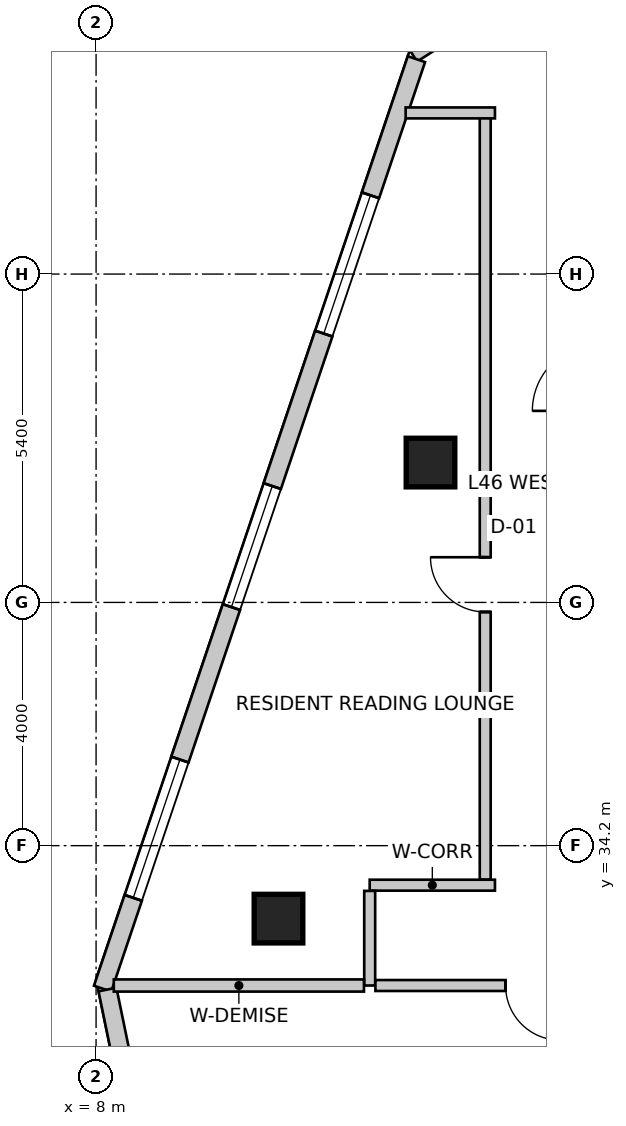
"""IFC4 building model, lengths in metres.
Left out: names, types, materials, properties, quantities, classifications, styles, units other than length and angle.
Written with IfcOpenShell. Run it as: python <this file> out.ifc"""

import sys

from ifc_helpers import new_model, si_unit, direction, frame, frame_2d, origin, origin_2d, place, context, subcontext, project, spatial, rectangle, extrude, source, transform, mapped, element, fill, save


model = new_model("IFC4")
c1 = context("Model", 3, precision=1e-05, world=origin(), true_north=direction((0.0, 1.0)))
c2 = subcontext(c1, "Body", "Model", "MODEL_VIEW")
j1 = project(units=[si_unit("LENGTHUNIT", "METRE"), si_unit("PLANEANGLEUNIT", "RADIAN")], contexts=[c1])
p1 = place(None, origin())
s1 = spatial("IfcSite", under=j1, at=p1, CompositionType="ELEMENT")
p2 = place(p1, origin())
s2 = spatial("IfcBuilding", under=s1, at=p2, CompositionType="ELEMENT")
p3 = place(p2, frame((0.0, 0.0, 186.9)))
s3 = spatial("IfcBuildingStorey", under=s2, at=p3, CompositionType="ELEMENT", Elevation=186.9)
m1 = source(origin(), c2, "Body", "SweptSolid", [
    extrude(rectangle(XDim=0.8, YDim=0.8, at=origin_2d()), origin(), (0.0, 0.0, 1.0), 3.5),
])
for number, where, z_axis, x_axis in (
    (1, (11.0, 33.0, 0.0), (0.0, 0.0, 1.0), (1.0, 0.0, 0.0)),
    (2, (13.5, 40.5, 0.0), (0.0, 0.0, 1.0), (1.0, 0.0, 0.0)),
):
    element("IfcColumn", number, at=place(p3, frame(where, z_axis=z_axis, x_axis=x_axis)), inside=s3, PredefinedType="COLUMN", context=c2, shape_type="MappedRepresentation", body=[
        mapped(m1, transform((0.0, 0.0, 0.0), scale=1.0)),
    ])
p4 = place(p3, frame((21.875, 52.742, 0.0), z_axis=(0.0, 0.0, 1.0), x_axis=(-0.843666375448, -0.536867811419, 0.0)))
e3 = element("IfcWall", 3, at=p4, inside=s3, PredefinedType="SOLIDWALL", context=c2, shape_type="SweptSolid", body=[
    extrude(rectangle(XDim=10.284, YDim=0.3, at=frame_2d((5.142, 0.0))), origin(), (0.0, 0.0, 1.0), 3.25),
])
m2 = source(origin(), c2, "Body", "SweptSolid", [
    extrude(rectangle(XDim=2.1, YDim=2.0, at=frame_2d((1.05, 1.0))), frame((0.0, 0.16, 0.0), z_axis=(0.0, -1.0, 0.0), x_axis=(1.0, 0.0, 0.0)), (0.0, 0.0, 1.0), 0.32),
])
p5 = place(p4, frame((3.457, 0.0, 0.85)))
e4 = element("IfcOpeningElement", 4, at=p5, cuts=e3, PredefinedType="OPENING", context=c2, shape_type="MappedRepresentation", body=[
    mapped(m2, transform((0.0, 0.0, 0.0), scale=1.0)),
])
p6 = place(p3, frame((13.269, 47.134, 0.0), z_axis=(0.0, 0.0, 1.0), x_axis=(-0.319920776449, -0.947444297464, 0.0)))
e5 = element("IfcWall", 5, at=p6, inside=s3, PredefinedType="SOLIDWALL", context=c2, shape_type="SweptSolid", body=[
    extrude(rectangle(XDim=16.133, YDim=0.3, at=frame_2d((8.067, 0.0))), origin(), (0.0, 0.0, 1.0), 3.25),
])
m3 = source(origin(), c2, "Body", "SweptSolid", [
    extrude(rectangle(XDim=2.4, YDim=2.2, at=frame_2d((1.2, 1.1))), frame((0.0, 0.16, 0.0), z_axis=(0.0, -1.0, 0.0), x_axis=(1.0, 0.0, 0.0)), (0.0, 0.0, 1.0), 0.32),
])
p7 = place(p6, frame((2.363, 0.0, 0.85)))
e6 = element("IfcOpeningElement", 6, at=p7, cuts=e5, PredefinedType="OPENING", context=c2, shape_type="MappedRepresentation", body=[
    mapped(m3, transform((0.0, 0.0, 0.0), scale=1.0)),
])
p8 = place(p6, frame((7.41, 0.0, 0.85)))
e7 = element("IfcOpeningElement", 7, at=p8, cuts=e5, PredefinedType="OPENING", context=c2, shape_type="MappedRepresentation", body=[
    mapped(m2, transform((0.0, 0.0, 0.0), scale=1.0)),
])
p9 = place(p6, frame((12.157, 0.0, 0.85)))
e8 = element("IfcOpeningElement", 8, at=p9, cuts=e5, PredefinedType="OPENING", context=c2, shape_type="MappedRepresentation", body=[
    mapped(m3, transform((0.0, 0.0, 0.0), scale=1.0)),
])
p10 = place(p3, frame((8.188, 31.834, 0.0), z_axis=(0.0, 0.0, 1.0), x_axis=(0.202303475707, -0.979322880217, 0.0)))
e9 = element("IfcWall", 9, at=p10, inside=s3, PredefinedType="SOLIDWALL", context=c2, shape_type="SweptSolid", body=[
    extrude(rectangle(XDim=15.766, YDim=0.3, at=frame_2d((7.883, 0.0))), origin(), (0.0, 0.0, 1.0), 3.25),
])
p11 = place(p10, frame((1.554, 0.0, 0.85)))
e10 = element("IfcOpeningElement", 10, at=p11, cuts=e9, PredefinedType="OPENING", context=c2, shape_type="MappedRepresentation", body=[
    mapped(m2, transform((0.0, 0.0, 0.0), scale=1.0)),
])
p12 = place(p10, frame((5.971, 0.0, 0.85)))
e11 = element("IfcOpeningElement", 11, at=p12, cuts=e9, PredefinedType="OPENING", context=c2, shape_type="MappedRepresentation", body=[
    mapped(m3, transform((0.0, 0.0, 0.0), scale=1.0)),
])
p13 = place(p10, frame((11.62, 0.0, 0.85)))
e12 = element("IfcOpeningElement", 12, at=p13, cuts=e9, PredefinedType="OPENING", context=c2, shape_type="MappedRepresentation", body=[
    mapped(m2, transform((0.0, 0.0, 0.0), scale=1.0)),
])
p14 = place(p3, frame((12.5, 33.55, 0.0), z_axis=(0.0, 0.0, 1.0), x_axis=(1.0, 0.0, 0.0)))
e13 = element("IfcWall", 13, at=p14, inside=s3, PredefinedType="PARTITIONING", context=c2, shape_type="SweptSolid", body=[
    extrude(rectangle(XDim=2.06, YDim=0.18, at=frame_2d((1.03, 0.0))), origin(), (0.0, 0.0, 1.0), 3.25),
])
p15 = place(p3, frame((12.5, 31.9, 0.0), z_axis=(0.0, 0.0, 1.0), x_axis=(0.0, 1.0, 0.0)))
e14 = element("IfcWall", 14, at=p15, inside=s3, PredefinedType="PARTITIONING", context=c2, shape_type="SweptSolid", body=[
    extrude(rectangle(XDim=1.556, YDim=0.18, at=frame_2d((0.778, 0.0))), origin(), (0.0, 0.0, 1.0), 2.919),
])
p16 = place(p3, frame((17.651, 31.9, 0.0), z_axis=(0.0, 0.0, 1.0), x_axis=(-1.0, 0.0, 0.0)))
e15 = element("IfcWall", 15, at=p16, inside=s3, PredefinedType="PARTITIONING", context=c2, shape_type="SweptSolid", body=[
    extrude(rectangle(XDim=5.057, YDim=0.18, at=frame_2d((2.528, 0.0))), origin(), (0.0, 0.0, 1.0), 2.919),
])
m4 = source(origin(), c2, "Body", "SweptSolid", [
    extrude(rectangle(XDim=0.9, YDim=2.15, at=frame_2d((0.45, 1.075))), frame((0.0, 0.1, 0.0), z_axis=(0.0, -1.0, 0.0), x_axis=(1.0, 0.0, 0.0)), (0.0, 0.0, 1.0), 0.2),
])
p17 = place(p16, frame((2.017, 0.0, 0.0)))
e16 = element("IfcOpeningElement", 16, at=p17, cuts=e15, PredefinedType="OPENING", context=c2, shape_type="MappedRepresentation", body=[
    mapped(m4, transform((0.0, 0.0, 0.0), scale=1.0)),
])
p18 = place(p3, frame((14.4, 33.644, 0.0), z_axis=(0.0, 0.0, 1.0), x_axis=(0.0, 1.0, 0.0)))
e17 = element("IfcWall", 17, at=p18, inside=s3, PredefinedType="PARTITIONING", context=c2, shape_type="SweptSolid", body=[
    extrude(rectangle(XDim=12.606, YDim=0.18, at=frame_2d((6.303, 0.0))), origin(), (0.0, 0.0, 1.0), 3.25),
])
p19 = place(p18, frame((4.399, 0.0, 0.0)))
e18 = element("IfcOpeningElement", 18, at=p19, cuts=e17, PredefinedType="OPENING", context=c2, shape_type="MappedRepresentation", body=[
    mapped(m4, transform((0.0, 0.0, 0.0), scale=1.0)),
])
p20 = place(p3, frame((14.56, 46.25, 0.0), z_axis=(0.0, 0.0, 1.0), x_axis=(-1.0, 0.0, 0.0)))
e19 = element("IfcWall", 19, at=p20, inside=s3, PredefinedType="PARTITIONING", context=c2, shape_type="SweptSolid", body=[
    extrude(rectangle(XDim=1.469, YDim=0.18, at=frame_2d((0.734, 0.0))), origin(), (0.0, 0.0, 1.0), 3.25),
])
p21 = place(p3, frame((12.406, 31.9, 0.0), z_axis=(0.0, 0.0, 1.0), x_axis=(-1.0, 0.0, 0.0)))
e20 = element("IfcWall", 20, at=p21, inside=s3, PredefinedType="PARTITIONING", context=c2, shape_type="SweptSolid", body=[
    extrude(rectangle(XDim=4.115, YDim=0.2, at=frame_2d((2.057, 0.0))), origin(), (0.0, 0.0, 1.0), 2.542),
])
m5 = source(origin(), c2, "Body", "SweptSolid", [
    extrude(rectangle(XDim=2.4, YDim=2.2, at=frame_2d((1.2, 1.1))), frame((0.0, -0.015, 0.0), z_axis=(0.0, -1.0, 0.0), x_axis=(1.0, 0.0, 0.0)), (0.0, 0.0, 1.0), 0.06),
])
p22 = place(p7, origin())
e21 = element("IfcWindow", 21, at=p22, inside=s3, PartitioningType="SINGLE_PANEL", PredefinedType="WINDOW", context=c2, shape_type="MappedRepresentation", body=[
    mapped(m5, transform((0.0, 0.0, 0.0), scale=1.0)),
])
fill(e6, e21)
m6 = source(origin(), c2, "Body", "SweptSolid", [
    extrude(rectangle(XDim=2.1, YDim=2.0, at=frame_2d((1.05, 1.0))), frame((0.0, -0.015, 0.0), z_axis=(0.0, -1.0, 0.0), x_axis=(1.0, 0.0, 0.0)), (0.0, 0.0, 1.0), 0.06),
])
p23 = place(p8, origin())
e22 = element("IfcWindow", 22, at=p23, inside=s3, PartitioningType="SINGLE_PANEL", PredefinedType="WINDOW", context=c2, shape_type="MappedRepresentation", body=[
    mapped(m6, transform((0.0, 0.0, 0.0), scale=1.0)),
])
fill(e7, e22)
p24 = place(p9, origin())
e23 = element("IfcWindow", 23, at=p24, inside=s3, PartitioningType="SINGLE_PANEL", PredefinedType="WINDOW", context=c2, shape_type="MappedRepresentation", body=[
    mapped(m5, transform((0.0, 0.0, 0.0), scale=1.0)),
])
fill(e8, e23)
m7 = source(origin(), c2, "Body", "SweptSolid", [
    extrude(rectangle(XDim=0.9, YDim=2.15, at=frame_2d((0.45, 1.075))), frame((0.0, 0.025, 0.0), z_axis=(0.0, -1.0, 0.0), x_axis=(1.0, 0.0, 0.0)), (0.0, 0.0, 1.0), 0.05),
])
p25 = place(p19, origin())
e24 = element("IfcDoor", 24, at=p25, inside=s3, OperationType="SINGLE_SWING_RIGHT", PredefinedType="DOOR", context=c2, shape_type="MappedRepresentation", body=[
    mapped(m7, transform((0.0, 0.0, 0.0), scale=1.0)),
])
fill(e18, e24)
m8 = source(origin(), c2, "Body", "SweptSolid", [
    extrude(rectangle(XDim=0.9, YDim=2.15, at=frame_2d((0.45, 1.075))), frame((0.0, 0.025, 0.0), z_axis=(0.0, -1.0, 0.0), x_axis=(1.0, 0.0, 0.0)), (0.0, 0.0, 1.0), 0.05),
])
p26 = place(p17, origin())
e25 = element("IfcDoor", 25, at=p26, inside=s3, OperationType="SINGLE_SWING_LEFT", PredefinedType="DOOR", context=c2, shape_type="MappedRepresentation", body=[
    mapped(m8, transform((0.0, 0.0, 0.0), scale=1.0)),
])
fill(e16, e25)
save(model, sys.argv[1])
